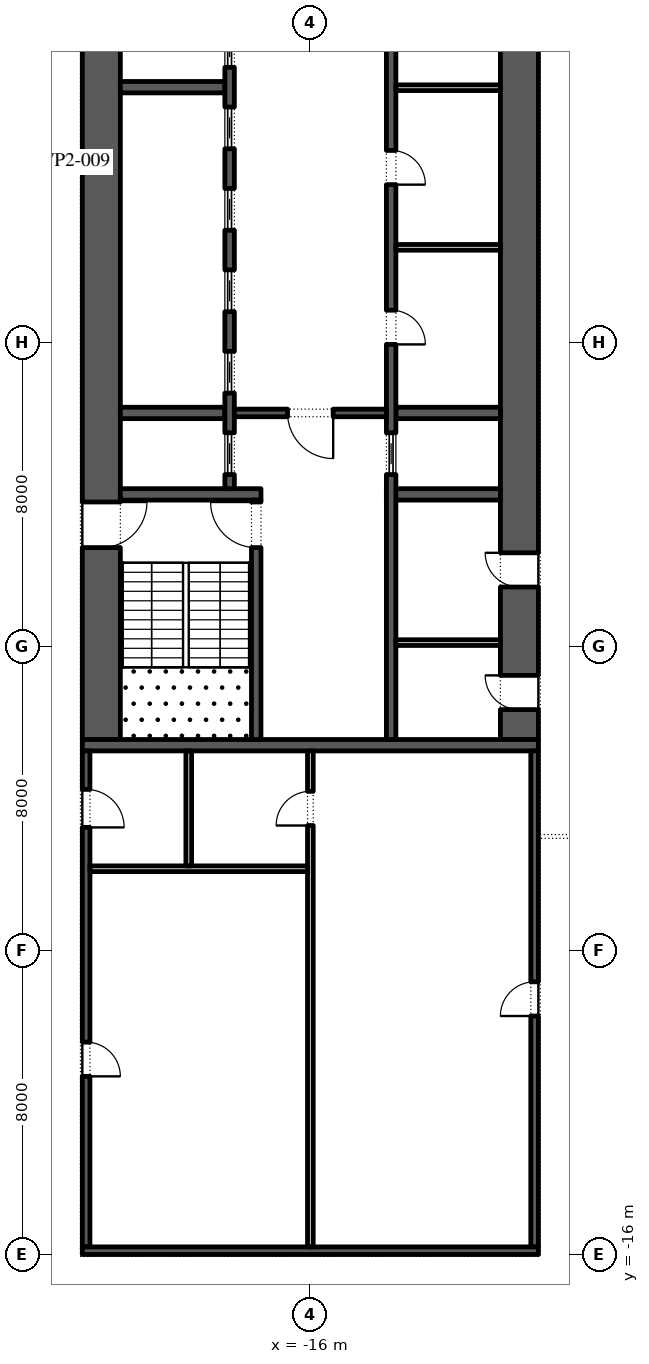
"""IFC4 building model, lengths in metres.
Left out: names, types, materials, properties, quantities, classifications, styles, units other than length and angle.
Written with IfcOpenShell. Run it as: python <this file> out.ifc"""

import sys

from ifc_helpers import new_model, si_unit, direction, frame, frame_2d, origin, place, context, subcontext, project, spatial, rectangle, extrude, element, fill, save


model = new_model("IFC4")
c1 = context("Model", 3, precision=1e-05, world=origin(), true_north=direction((0.0, 1.0)))
c2 = subcontext(c1, "Body", "Model", "MODEL_VIEW")
j1 = project(units=[si_unit("LENGTHUNIT", "METRE"), si_unit("PLANEANGLEUNIT", "RADIAN")], contexts=[c1])
p1 = place(None, origin())
s1 = spatial("IfcSite", under=j1, at=p1, CompositionType="ELEMENT")
p2 = place(p1, origin())
s2 = spatial("IfcBuilding", under=s1, at=p2, CompositionType="ELEMENT")
p3 = place(p2, frame((0.0, 0.0, 69.0)))
s3 = spatial("IfcBuildingStorey", under=s2, at=p3, CompositionType="ELEMENT", Elevation=69.0)
p4 = place(p3, frame((-21.5, -2.45, 0.0), z_axis=(0.0, 0.0, 1.0), x_axis=(0.0, 1.0, 0.0)))
e1 = element("IfcWall", 1, at=p4, inside=s3, PredefinedType="SHEAR", context=c2, shape_type="SweptSolid", body=[
    extrude(rectangle(XDim=27.9, YDim=1.0, at=frame_2d((13.95, 0.0))), origin(), (0.0, 0.0, 1.0), 4.0),
])
p5 = place(p4, frame((5.05, 0.0, 0.0)))
e2 = element("IfcOpeningElement", 2, at=p5, cuts=e1, PredefinedType="OPENING", context=c2, shape_type="SweptSolid", body=[
    extrude(rectangle(XDim=1.2, YDim=2.1, at=frame_2d((0.6, 1.05))), frame((0.0, 0.51, 0.0), z_axis=(0.0, -1.0, 0.0), x_axis=(1.0, 0.0, 0.0)), (0.0, 0.0, 1.0), 1.02),
])
p6 = place(p4, frame((21.65, 0.0, 0.0)))
e3 = element("IfcOpeningElement", 3, at=p6, cuts=e1, PredefinedType="OPENING", context=c2, shape_type="SweptSolid", body=[
    extrude(rectangle(XDim=1.2, YDim=2.1, at=frame_2d((0.6, 1.05))), frame((0.0, 0.51, 0.0), z_axis=(0.0, -1.0, 0.0), x_axis=(1.0, 0.0, 0.0)), (0.0, 0.0, 1.0), 1.02),
])
p7 = place(p3, frame((-10.5, -2.45, 0.0), z_axis=(0.0, 0.0, 1.0), x_axis=(0.0, 1.0, 0.0)))
e4 = element("IfcWall", 4, at=p7, inside=s3, PredefinedType="SHEAR", context=c2, shape_type="SweptSolid", body=[
    extrude(rectangle(XDim=27.9, YDim=1.0, at=frame_2d((13.95, 0.0))), origin(), (0.0, 0.0, 1.0), 4.0),
])
p8 = place(p7, frame((23.65, 0.0, 0.0)))
e5 = element("IfcOpeningElement", 5, at=p8, cuts=e4, PredefinedType="OPENING", context=c2, shape_type="SweptSolid", body=[
    extrude(rectangle(XDim=2.4, YDim=2.1, at=frame_2d((1.2, 1.05))), frame((0.0, 0.51, 0.0), z_axis=(0.0, -1.0, 0.0), x_axis=(1.0, 0.0, 0.0)), (0.0, 0.0, 1.0), 1.02),
])
p9 = place(p7, frame((0.788, 0.0, 0.0)))
e6 = element("IfcOpeningElement", 6, at=p9, cuts=e4, PredefinedType="OPENING", context=c2, shape_type="SweptSolid", body=[
    extrude(rectangle(XDim=0.9, YDim=2.1, at=frame_2d((0.45, 1.05))), frame((0.0, 0.51, 0.0), z_axis=(0.0, -1.0, 0.0), x_axis=(1.0, 0.0, 0.0)), (0.0, 0.0, 1.0), 1.02),
])
p10 = place(p7, frame((4.012, 0.0, 0.0)))
e7 = element("IfcOpeningElement", 7, at=p10, cuts=e4, PredefinedType="OPENING", context=c2, shape_type="SweptSolid", body=[
    extrude(rectangle(XDim=0.9, YDim=2.1, at=frame_2d((0.45, 1.05))), frame((0.0, 0.51, 0.0), z_axis=(0.0, -1.0, 0.0), x_axis=(1.0, 0.0, 0.0)), (0.0, 0.0, 1.0), 1.02),
])
p11 = place(p3, frame((-22.0, -2.6, 0.0), z_axis=(0.0, 0.0, 1.0), x_axis=(1.0, 0.0, 0.0)))
e8 = element("IfcWall", 8, at=p11, inside=s3, PredefinedType="SHEAR", context=c2, shape_type="SweptSolid", body=[
    extrude(rectangle(XDim=12.0, YDim=0.3, at=frame_2d((6.0, 0.0))), origin(), (0.0, 0.0, 1.0), 4.0),
])
p12 = place(p3, frame((-21.0, 4.0, 0.0), z_axis=(0.0, 0.0, 1.0), x_axis=(1.0, 0.0, 0.0)))
e9 = element("IfcWall", 9, at=p12, inside=s3, PredefinedType="SHEAR", context=c2, shape_type="SweptSolid", body=[
    extrude(rectangle(XDim=3.7, YDim=0.3, at=frame_2d((1.85, 0.0))), origin(), (0.0, 0.0, 1.0), 4.0),
])
p13 = place(p3, frame((-17.425, -2.45, 0.0), z_axis=(0.0, 0.0, 1.0), x_axis=(0.0, 1.0, 0.0)))
e10 = element("IfcWall", 10, at=p13, inside=s3, PredefinedType="SHEAR", context=c2, shape_type="SweptSolid", body=[
    extrude(rectangle(XDim=6.3, YDim=0.25, at=frame_2d((3.15, 0.0))), origin(), (0.0, 0.0, 1.0), 4.0),
])
p14 = place(p13, frame((5.05, 0.0, 0.0)))
e11 = element("IfcOpeningElement", 11, at=p14, cuts=e10, PredefinedType="OPENING", context=c2, shape_type="SweptSolid", body=[
    extrude(rectangle(XDim=1.2, YDim=2.1, at=frame_2d((0.6, 1.05))), frame((0.0, 0.135, 0.0), z_axis=(0.0, -1.0, 0.0), x_axis=(1.0, 0.0, 0.0)), (0.0, 0.0, 1.0), 0.27),
])
for number, where, z_axis, x_axis in (
    (12, (-21.0, 6.143, 0.0), (0.0, 0.0, 1.0), (1.0, 0.0, 0.0)),
    (13, (-21.0, 14.714, 0.0), (0.0, 0.0, 1.0), (1.0, 0.0, 0.0)),
):
    element("IfcWall", number, at=place(p3, frame(where, z_axis=z_axis, x_axis=x_axis)), inside=s3, PredefinedType="SHEAR", context=c2, shape_type="SweptSolid", body=[
        extrude(rectangle(XDim=2.75, YDim=0.3, at=frame_2d((1.375, 0.0))), origin(), (0.0, 0.0, 1.0), 4.0),
    ])
p15 = place(p3, frame((-18.125, 4.15, 0.0), z_axis=(0.0, 0.0, 1.0), x_axis=(0.0, 1.0, 0.0)))
e14 = element("IfcWall", 14, at=p15, inside=s3, PredefinedType="SHEAR", context=c2, shape_type="SweptSolid", body=[
    extrude(rectangle(XDim=14.7, YDim=0.25, at=frame_2d((7.35, 0.0))), origin(), (0.0, 0.0, 1.0), 4.0),
])
p16 = place(p15, frame((0.371, 0.0, 0.0)))
e15 = element("IfcOpeningElement", 15, at=p16, cuts=e14, PredefinedType="OPENING", context=c2, shape_type="SweptSolid", body=[
    extrude(rectangle(XDim=1.1, YDim=2.1, at=frame_2d((0.55, 1.05))), frame((0.0, 0.135, 0.0), z_axis=(0.0, -1.0, 0.0), x_axis=(1.0, 0.0, 0.0)), (0.0, 0.0, 1.0), 0.27),
])
p17 = place(p15, frame((2.514, 0.0, 0.0)))
e16 = element("IfcOpeningElement", 16, at=p17, cuts=e14, PredefinedType="OPENING", context=c2, shape_type="SweptSolid", body=[
    extrude(rectangle(XDim=1.1, YDim=2.1, at=frame_2d((0.55, 1.05))), frame((0.0, 0.135, 0.0), z_axis=(0.0, -1.0, 0.0), x_axis=(1.0, 0.0, 0.0)), (0.0, 0.0, 1.0), 0.27),
])
p18 = place(p15, frame((4.657, 0.0, 0.0)))
e17 = element("IfcOpeningElement", 17, at=p18, cuts=e14, PredefinedType="OPENING", context=c2, shape_type="SweptSolid", body=[
    extrude(rectangle(XDim=1.1, YDim=2.1, at=frame_2d((0.55, 1.05))), frame((0.0, 0.135, 0.0), z_axis=(0.0, -1.0, 0.0), x_axis=(1.0, 0.0, 0.0)), (0.0, 0.0, 1.0), 0.27),
])
p19 = place(p15, frame((6.8, 0.0, 0.0)))
e18 = element("IfcOpeningElement", 18, at=p19, cuts=e14, PredefinedType="OPENING", context=c2, shape_type="SweptSolid", body=[
    extrude(rectangle(XDim=1.1, YDim=2.1, at=frame_2d((0.55, 1.05))), frame((0.0, 0.135, 0.0), z_axis=(0.0, -1.0, 0.0), x_axis=(1.0, 0.0, 0.0)), (0.0, 0.0, 1.0), 0.27),
])
p20 = place(p15, frame((8.943, 0.0, 0.0)))
e19 = element("IfcOpeningElement", 19, at=p20, cuts=e14, PredefinedType="OPENING", context=c2, shape_type="SweptSolid", body=[
    extrude(rectangle(XDim=1.1, YDim=2.1, at=frame_2d((0.55, 1.05))), frame((0.0, 0.135, 0.0), z_axis=(0.0, -1.0, 0.0), x_axis=(1.0, 0.0, 0.0)), (0.0, 0.0, 1.0), 0.27),
])
p21 = place(p15, frame((11.086, 0.0, 0.0)))
e20 = element("IfcOpeningElement", 20, at=p21, cuts=e14, PredefinedType="OPENING", context=c2, shape_type="SweptSolid", body=[
    extrude(rectangle(XDim=1.1, YDim=2.1, at=frame_2d((0.55, 1.05))), frame((0.0, 0.135, 0.0), z_axis=(0.0, -1.0, 0.0), x_axis=(1.0, 0.0, 0.0)), (0.0, 0.0, 1.0), 0.27),
])
p22 = place(p15, frame((13.229, 0.0, 0.0)))
e21 = element("IfcOpeningElement", 21, at=p22, cuts=e14, PredefinedType="OPENING", context=c2, shape_type="SweptSolid", body=[
    extrude(rectangle(XDim=1.1, YDim=2.1, at=frame_2d((0.55, 1.05))), frame((0.0, 0.135, 0.0), z_axis=(0.0, -1.0, 0.0), x_axis=(1.0, 0.0, 0.0)), (0.0, 0.0, 1.0), 0.27),
])
p23 = place(p3, frame((-14.0, 4.0, 0.0), z_axis=(0.0, 0.0, 1.0), x_axis=(1.0, 0.0, 0.0)))
e22 = element("IfcWall", 22, at=p23, inside=s3, PredefinedType="SHEAR", context=c2, shape_type="SweptSolid", body=[
    extrude(rectangle(XDim=3.0, YDim=0.3, at=frame_2d((1.5, 0.0))), origin(), (0.0, 0.0, 1.0), 4.0),
])
p24 = place(p3, frame((-13.75, 6.143, 0.0), z_axis=(0.0, 0.0, 1.0), x_axis=(1.0, 0.0, 0.0)))
e23 = element("IfcWall", 23, at=p24, inside=s3, PredefinedType="SHEAR", context=c2, shape_type="SweptSolid", body=[
    extrude(rectangle(XDim=2.75, YDim=0.3, at=frame_2d((1.375, 0.0))), origin(), (0.0, 0.0, 1.0), 4.0),
])
p25 = place(p3, frame((-13.875, -2.45, 0.0), z_axis=(0.0, 0.0, 1.0), x_axis=(0.0, 1.0, 0.0)))
e24 = element("IfcWall", 24, at=p25, inside=s3, PredefinedType="SHEAR", context=c2, shape_type="SweptSolid", body=[
    extrude(rectangle(XDim=21.3, YDim=0.25, at=frame_2d((10.65, 0.0))), origin(), (0.0, 0.0, 1.0), 4.0),
])
p26 = place(p25, frame((10.396, 0.0, 0.0)))
e25 = element("IfcOpeningElement", 25, at=p26, cuts=e24, PredefinedType="OPENING", context=c2, shape_type="SweptSolid", body=[
    extrude(rectangle(XDim=0.9, YDim=2.1, at=frame_2d((0.45, 1.05))), frame((0.0, 0.135, 0.0), z_axis=(0.0, -1.0, 0.0), x_axis=(1.0, 0.0, 0.0)), (0.0, 0.0, 1.0), 0.27),
])
p27 = place(p25, frame((14.6, 0.0, 0.0)))
e26 = element("IfcOpeningElement", 26, at=p27, cuts=e24, PredefinedType="OPENING", context=c2, shape_type="SweptSolid", body=[
    extrude(rectangle(XDim=0.9, YDim=2.1, at=frame_2d((0.45, 1.05))), frame((0.0, 0.135, 0.0), z_axis=(0.0, -1.0, 0.0), x_axis=(1.0, 0.0, 0.0)), (0.0, 0.0, 1.0), 0.27),
])
p28 = place(p25, frame((18.775, 0.0, 0.0)))
e27 = element("IfcOpeningElement", 27, at=p28, cuts=e24, PredefinedType="OPENING", context=c2, shape_type="SweptSolid", body=[
    extrude(rectangle(XDim=0.9, YDim=2.1, at=frame_2d((0.45, 1.05))), frame((0.0, 0.135, 0.0), z_axis=(0.0, -1.0, 0.0), x_axis=(1.0, 0.0, 0.0)), (0.0, 0.0, 1.0), 0.27),
])
p29 = place(p25, frame((6.971, 0.0, 0.0)))
e28 = element("IfcOpeningElement", 28, at=p29, cuts=e24, PredefinedType="OPENING", context=c2, shape_type="SweptSolid", body=[
    extrude(rectangle(XDim=1.1, YDim=2.1, at=frame_2d((0.55, 1.05))), frame((0.0, 0.135, 0.0), z_axis=(0.0, -1.0, 0.0), x_axis=(1.0, 0.0, 0.0)), (0.0, 0.0, 1.0), 0.27),
])
for number, where, z_axis, x_axis in (
    (29, (-13.75, 10.5, 0.0), (0.0, 0.0, 1.0), (1.0, 0.0, 0.0)),
    (30, (-13.75, 14.7, 0.0), (0.0, 0.0, 1.0), (1.0, 0.0, 0.0)),
):
    element("IfcWall", number, at=place(p3, frame(where, z_axis=z_axis, x_axis=x_axis)), inside=s3, PredefinedType="PARTITIONING", context=c2, shape_type="SweptSolid", body=[
        extrude(rectangle(XDim=2.75, YDim=0.15, at=frame_2d((1.375, 0.0))), origin(), (0.0, 0.0, 1.0), 4.0),
    ])
p30 = place(p3, frame((-18.0, 6.143, 0.0), z_axis=(0.0, 0.0, 1.0), x_axis=(1.0, 0.0, 0.0)))
e31 = element("IfcWall", 31, at=p30, inside=s3, PredefinedType="SHEAR", context=c2, shape_type="SweptSolid", body=[
    extrude(rectangle(XDim=4.0, YDim=0.2, at=frame_2d((2.0, 0.0))), origin(), (0.0, 0.0, 1.0), 4.0),
])
p31 = place(p30, frame((1.4, 0.0, 0.0)))
e32 = element("IfcOpeningElement", 32, at=p31, cuts=e31, PredefinedType="OPENING", context=c2, shape_type="SweptSolid", body=[
    extrude(rectangle(XDim=1.2, YDim=2.1, at=frame_2d((0.6, 1.05))), frame((0.0, 0.11, 0.0), z_axis=(0.0, -1.0, 0.0), x_axis=(1.0, 0.0, 0.0)), (0.0, 0.0, 1.0), 0.22),
])
p32 = place(p3, frame((-13.75, 0.1, 0.0), z_axis=(0.0, 0.0, 1.0), x_axis=(1.0, 0.0, 0.0)))
e33 = element("IfcWall", 33, at=p32, inside=s3, PredefinedType="PARTITIONING", context=c2, shape_type="SweptSolid", body=[
    extrude(rectangle(XDim=2.75, YDim=0.15, at=frame_2d((1.375, 0.0))), origin(), (0.0, 0.0, 1.0), 4.0),
])
p33 = place(p3, frame((-21.9, -15.8, 0.0), z_axis=(0.0, 0.0, 1.0), x_axis=(0.0, 1.0, 0.0)))
e34 = element("IfcWall", 34, at=p33, inside=s3, PredefinedType="SHEAR", context=c2, shape_type="SweptSolid", body=[
    extrude(rectangle(XDim=13.05, YDim=0.2, at=frame_2d((6.525, 0.0))), origin(), (0.0, 0.0, 1.0), 4.0),
])
p34 = place(p33, frame((4.488, 0.0, 0.0)))
e35 = element("IfcOpeningElement", 35, at=p34, cuts=e34, PredefinedType="OPENING", context=c2, shape_type="SweptSolid", body=[
    extrude(rectangle(XDim=0.9, YDim=2.1, at=frame_2d((0.45, 1.05))), frame((0.0, 0.11, 0.0), z_axis=(0.0, -1.0, 0.0), x_axis=(1.0, 0.0, 0.0)), (0.0, 0.0, 1.0), 0.22),
])
p35 = place(p33, frame((11.038, 0.0, 0.0)))
e36 = element("IfcOpeningElement", 36, at=p35, cuts=e34, PredefinedType="OPENING", context=c2, shape_type="SweptSolid", body=[
    extrude(rectangle(XDim=1.0, YDim=2.1, at=frame_2d((0.5, 1.05))), frame((0.0, 0.11, 0.0), z_axis=(0.0, -1.0, 0.0), x_axis=(1.0, 0.0, 0.0)), (0.0, 0.0, 1.0), 0.22),
])
p36 = place(p3, frame((-10.1, -15.8, 0.0), z_axis=(0.0, 0.0, 1.0), x_axis=(0.0, 1.0, 0.0)))
e37 = element("IfcWall", 37, at=p36, inside=s3, PredefinedType="SHEAR", context=c2, shape_type="SweptSolid", body=[
    extrude(rectangle(XDim=13.05, YDim=0.2, at=frame_2d((6.525, 0.0))), origin(), (0.0, 0.0, 1.0), 4.0),
])
p37 = place(p36, frame((6.075, 0.0, 0.0)))
e38 = element("IfcOpeningElement", 38, at=p37, cuts=e37, PredefinedType="OPENING", context=c2, shape_type="SweptSolid", body=[
    extrude(rectangle(XDim=0.9, YDim=2.1, at=frame_2d((0.45, 1.05))), frame((0.0, 0.11, 0.0), z_axis=(0.0, -1.0, 0.0), x_axis=(1.0, 0.0, 0.0)), (0.0, 0.0, 1.0), 0.22),
])
p38 = place(p3, frame((-22.0, -15.9, 0.0), z_axis=(0.0, 0.0, 1.0), x_axis=(1.0, 0.0, 0.0)))
e39 = element("IfcWall", 39, at=p38, inside=s3, PredefinedType="SHEAR", context=c2, shape_type="SweptSolid", body=[
    extrude(rectangle(XDim=12.0, YDim=0.2, at=frame_2d((6.0, 0.0))), origin(), (0.0, 0.0, 1.0), 4.0),
])
p39 = place(p3, frame((-16.0, -15.8, 0.0), z_axis=(0.0, 0.0, 1.0), x_axis=(0.0, 1.0, 0.0)))
e40 = element("IfcWall", 40, at=p39, inside=s3, PredefinedType="PARTITIONING", context=c2, shape_type="SweptSolid", body=[
    extrude(rectangle(XDim=13.05, YDim=0.15, at=frame_2d((6.525, 0.0))), origin(), (0.0, 0.0, 1.0), 4.0),
])
p40 = place(p39, frame((11.087, 0.0, 0.0)))
e41 = element("IfcOpeningElement", 41, at=p40, cuts=e40, PredefinedType="OPENING", context=c2, shape_type="SweptSolid", body=[
    extrude(rectangle(XDim=0.9, YDim=2.1, at=frame_2d((0.45, 1.05))), frame((0.0, 0.085, 0.0), z_axis=(0.0, -1.0, 0.0), x_axis=(1.0, 0.0, 0.0)), (0.0, 0.0, 1.0), 0.17),
])
p41 = place(p3, frame((-21.8, -5.85, 0.0), z_axis=(0.0, 0.0, 1.0), x_axis=(1.0, 0.0, 0.0)))
e42 = element("IfcWall", 42, at=p41, inside=s3, PredefinedType="PARTITIONING", context=c2, shape_type="SweptSolid", body=[
    extrude(rectangle(XDim=5.725, YDim=0.15, at=frame_2d((2.863, 0.0))), origin(), (0.0, 0.0, 1.0), 4.0),
])
p42 = place(p3, frame((-19.2, -5.775, 0.0), z_axis=(0.0, 0.0, 1.0), x_axis=(0.0, 1.0, 0.0)))
e43 = element("IfcWall", 43, at=p42, inside=s3, PredefinedType="PARTITIONING", context=c2, shape_type="SweptSolid", body=[
    extrude(rectangle(XDim=3.025, YDim=0.15, at=frame_2d((1.512, 0.0))), origin(), (0.0, 0.0, 1.0), 4.0),
])
p43 = place(p16, origin())
e44 = element("IfcDoor", 44, at=p43, inside=s3, OperationType="SLIDING_TO_LEFT", PredefinedType="DOOR", context=c2, shape_type="SweptSolid", body=[
    extrude(rectangle(XDim=1.1, YDim=2.1, at=frame_2d((0.55, 1.05))), frame((0.0, 0.025, 0.0), z_axis=(0.0, -1.0, 0.0), x_axis=(1.0, 0.0, 0.0)), (0.0, 0.0, 1.0), 0.05),
])
fill(e15, e44)
p44 = place(p17, origin())
e45 = element("IfcDoor", 45, at=p44, inside=s3, OperationType="SLIDING_TO_LEFT", PredefinedType="DOOR", context=c2, shape_type="SweptSolid", body=[
    extrude(rectangle(XDim=1.1, YDim=2.1, at=frame_2d((0.55, 1.05))), frame((0.0, 0.025, 0.0), z_axis=(0.0, -1.0, 0.0), x_axis=(1.0, 0.0, 0.0)), (0.0, 0.0, 1.0), 0.05),
])
fill(e16, e45)
p45 = place(p18, origin())
e46 = element("IfcDoor", 46, at=p45, inside=s3, OperationType="SLIDING_TO_LEFT", PredefinedType="DOOR", context=c2, shape_type="SweptSolid", body=[
    extrude(rectangle(XDim=1.1, YDim=2.1, at=frame_2d((0.55, 1.05))), frame((0.0, 0.025, 0.0), z_axis=(0.0, -1.0, 0.0), x_axis=(1.0, 0.0, 0.0)), (0.0, 0.0, 1.0), 0.05),
])
fill(e17, e46)
p46 = place(p19, origin())
e47 = element("IfcDoor", 47, at=p46, inside=s3, OperationType="SLIDING_TO_LEFT", PredefinedType="DOOR", context=c2, shape_type="SweptSolid", body=[
    extrude(rectangle(XDim=1.1, YDim=2.1, at=frame_2d((0.55, 1.05))), frame((0.0, 0.025, 0.0), z_axis=(0.0, -1.0, 0.0), x_axis=(1.0, 0.0, 0.0)), (0.0, 0.0, 1.0), 0.05),
])
fill(e18, e47)
p47 = place(p20, origin())
e48 = element("IfcDoor", 48, at=p47, inside=s3, OperationType="SLIDING_TO_LEFT", PredefinedType="DOOR", context=c2, shape_type="SweptSolid", body=[
    extrude(rectangle(XDim=1.1, YDim=2.1, at=frame_2d((0.55, 1.05))), frame((0.0, 0.025, 0.0), z_axis=(0.0, -1.0, 0.0), x_axis=(1.0, 0.0, 0.0)), (0.0, 0.0, 1.0), 0.05),
])
fill(e19, e48)
p48 = place(p21, origin())
e49 = element("IfcDoor", 49, at=p48, inside=s3, OperationType="SLIDING_TO_LEFT", PredefinedType="DOOR", context=c2, shape_type="SweptSolid", body=[
    extrude(rectangle(XDim=1.1, YDim=2.1, at=frame_2d((0.55, 1.05))), frame((0.0, 0.025, 0.0), z_axis=(0.0, -1.0, 0.0), x_axis=(1.0, 0.0, 0.0)), (0.0, 0.0, 1.0), 0.05),
])
fill(e20, e49)
p49 = place(p26, frame((0.9, -0.2, 0.0), z_axis=(0.0, 0.0, 1.0), x_axis=(-1.0, 0.0, 0.0)))
e50 = element("IfcDoor", 50, at=p49, inside=s3, OperationType="SINGLE_SWING_LEFT", PredefinedType="DOOR", context=c2, shape_type="SweptSolid", body=[
    extrude(rectangle(XDim=0.9, YDim=2.1, at=frame_2d((0.45, 1.05))), frame((0.0, -0.075, 0.0), z_axis=(0.0, -1.0, 0.0), x_axis=(1.0, 0.0, 0.0)), (0.0, 0.0, 1.0), 0.05),
])
fill(e25, e50)
p50 = place(p27, frame((0.9, -0.2, 0.0), z_axis=(0.0, 0.0, 1.0), x_axis=(-1.0, 0.0, 0.0)))
e51 = element("IfcDoor", 51, at=p50, inside=s3, OperationType="SINGLE_SWING_LEFT", PredefinedType="DOOR", context=c2, shape_type="SweptSolid", body=[
    extrude(rectangle(XDim=0.9, YDim=2.1, at=frame_2d((0.45, 1.05))), frame((0.0, -0.075, 0.0), z_axis=(0.0, -1.0, 0.0), x_axis=(1.0, 0.0, 0.0)), (0.0, 0.0, 1.0), 0.05),
])
fill(e26, e51)
p51 = place(p29, origin())
e52 = element("IfcDoor", 52, at=p51, inside=s3, OperationType="SLIDING_TO_LEFT", PredefinedType="DOOR", context=c2, shape_type="SweptSolid", body=[
    extrude(rectangle(XDim=1.1, YDim=2.1, at=frame_2d((0.55, 1.05))), frame((0.0, 0.025, 0.0), z_axis=(0.0, -1.0, 0.0), x_axis=(1.0, 0.0, 0.0)), (0.0, 0.0, 1.0), 0.05),
])
fill(e28, e52)
p52 = place(p31, frame((1.2, 0.0, 0.0), z_axis=(0.0, 0.0, 1.0), x_axis=(-1.0, 0.0, 0.0)))
e53 = element("IfcDoor", 53, at=p52, inside=s3, OperationType="SINGLE_SWING_RIGHT", PredefinedType="DOOR", context=c2, shape_type="SweptSolid", body=[
    extrude(rectangle(XDim=1.2, YDim=2.1, at=frame_2d((0.6, 1.05))), frame((0.0, 0.025, 0.0), z_axis=(0.0, -1.0, 0.0), x_axis=(1.0, 0.0, 0.0)), (0.0, 0.0, 1.0), 0.05),
])
fill(e32, e53)
p53 = place(p14, origin())
e54 = element("IfcDoor", 54, at=p53, inside=s3, OperationType="SINGLE_SWING_LEFT", PredefinedType="DOOR", context=c2, shape_type="SweptSolid", body=[
    extrude(rectangle(XDim=1.2, YDim=2.1, at=frame_2d((0.6, 1.05))), frame((0.0, 0.025, 0.0), z_axis=(0.0, -1.0, 0.0), x_axis=(1.0, 0.0, 0.0)), (0.0, 0.0, 1.0), 0.05),
])
fill(e11, e54)
p54 = place(p5, frame((1.2, 0.0, 0.0), z_axis=(0.0, 0.0, 1.0), x_axis=(-1.0, 0.0, 0.0)))
e55 = element("IfcDoor", 55, at=p54, inside=s3, OperationType="SINGLE_SWING_RIGHT", PredefinedType="DOOR", context=c2, shape_type="SweptSolid", body=[
    extrude(rectangle(XDim=1.2, YDim=2.1, at=frame_2d((0.6, 1.05))), frame((0.0, 0.025, 0.0), z_axis=(0.0, -1.0, 0.0), x_axis=(1.0, 0.0, 0.0)), (0.0, 0.0, 1.0), 0.05),
])
fill(e2, e55)
p55 = place(p9, origin())
e56 = element("IfcDoor", 56, at=p55, inside=s3, OperationType="SINGLE_SWING_LEFT", PredefinedType="DOOR", context=c2, shape_type="SweptSolid", body=[
    extrude(rectangle(XDim=0.9, YDim=2.1, at=frame_2d((0.45, 1.05))), frame((0.0, 0.5, 0.0), z_axis=(0.0, -1.0, 0.0), x_axis=(1.0, 0.0, 0.0)), (0.0, 0.0, 1.0), 0.05),
])
fill(e6, e56)
p56 = place(p10, origin())
e57 = element("IfcDoor", 57, at=p56, inside=s3, OperationType="SINGLE_SWING_LEFT", PredefinedType="DOOR", context=c2, shape_type="SweptSolid", body=[
    extrude(rectangle(XDim=0.9, YDim=2.1, at=frame_2d((0.45, 1.05))), frame((0.0, 0.5, 0.0), z_axis=(0.0, -1.0, 0.0), x_axis=(1.0, 0.0, 0.0)), (0.0, 0.0, 1.0), 0.05),
])
fill(e7, e57)
p57 = place(p34, frame((0.9, -0.15, 0.0), z_axis=(0.0, 0.0, 1.0), x_axis=(-1.0, 0.0, 0.0)))
e58 = element("IfcDoor", 58, at=p57, inside=s3, OperationType="SINGLE_SWING_LEFT", PredefinedType="DOOR", context=c2, shape_type="SweptSolid", body=[
    extrude(rectangle(XDim=0.9, YDim=2.1, at=frame_2d((0.45, 1.05))), frame((0.0, -0.05, 0.0), z_axis=(0.0, -1.0, 0.0), x_axis=(1.0, 0.0, 0.0)), (0.0, 0.0, 1.0), 0.05),
])
fill(e35, e58)
p58 = place(p35, frame((1.0, -0.15, 0.0), z_axis=(0.0, 0.0, 1.0), x_axis=(-1.0, 0.0, 0.0)))
e59 = element("IfcDoor", 59, at=p58, inside=s3, OperationType="SINGLE_SWING_LEFT", PredefinedType="DOOR", context=c2, shape_type="SweptSolid", body=[
    extrude(rectangle(XDim=1.0, YDim=2.1, at=frame_2d((0.5, 1.05))), frame((0.0, -0.05, 0.0), z_axis=(0.0, -1.0, 0.0), x_axis=(1.0, 0.0, 0.0)), (0.0, 0.0, 1.0), 0.05),
])
fill(e36, e59)
p59 = place(p40, origin())
e60 = element("IfcDoor", 60, at=p59, inside=s3, OperationType="SINGLE_SWING_RIGHT", PredefinedType="DOOR", context=c2, shape_type="SweptSolid", body=[
    extrude(rectangle(XDim=0.9, YDim=2.1, at=frame_2d((0.45, 1.05))), frame((0.0, 0.025, 0.0), z_axis=(0.0, -1.0, 0.0), x_axis=(1.0, 0.0, 0.0)), (0.0, 0.0, 1.0), 0.05),
])
fill(e41, e60)
p60 = place(p37, origin())
e61 = element("IfcDoor", 61, at=p60, inside=s3, OperationType="SINGLE_SWING_RIGHT", PredefinedType="DOOR", context=c2, shape_type="SweptSolid", body=[
    extrude(rectangle(XDim=0.9, YDim=2.1, at=frame_2d((0.45, 1.05))), frame((0.0, 0.1, 0.0), z_axis=(0.0, -1.0, 0.0), x_axis=(1.0, 0.0, 0.0)), (0.0, 0.0, 1.0), 0.05),
])
fill(e38, e61)
save(model, sys.argv[1])
